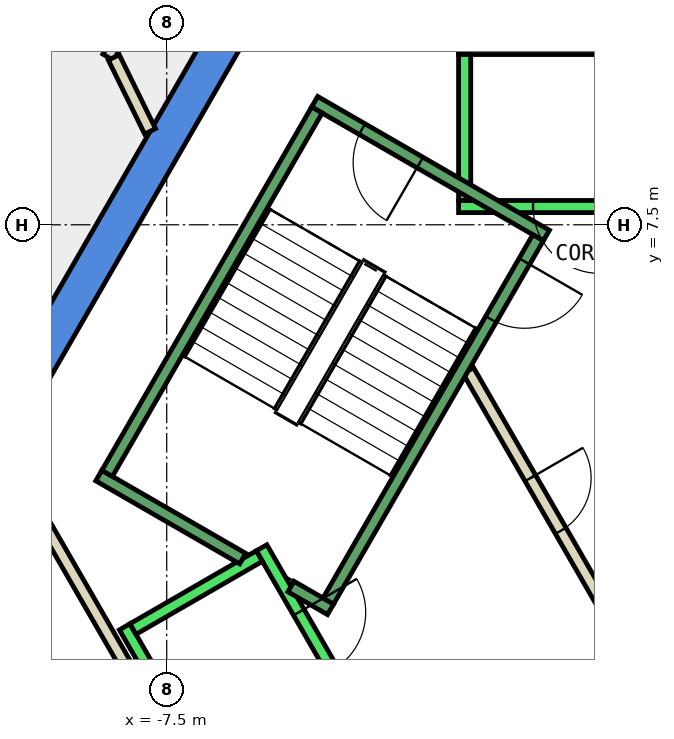
"""IFC4 building model, lengths in metres.
Left out: names, types, materials, properties, quantities, classifications, styles, units other than length and angle.
Written with IfcOpenShell. Run it as: python <this file> out.ifc"""

import sys

from ifc_helpers import new_model, si_unit, direction, frame, frame_2d, origin, place, context, subcontext, project, spatial, polyline, rectangle, outline, extrude, element, fill, save


model = new_model("IFC4")
c1 = context("Model", 3, precision=1e-05, world=origin(), true_north=direction((0.0, 1.0)))
c2 = subcontext(c1, "Body", "Model", "MODEL_VIEW")
j1 = project(units=[si_unit("LENGTHUNIT", "METRE"), si_unit("PLANEANGLEUNIT", "RADIAN")], contexts=[c1])
p1 = place(None, origin())
s1 = spatial("IfcSite", under=j1, at=p1, CompositionType="ELEMENT")
p2 = place(p1, origin())
s2 = spatial("IfcBuilding", under=s1, at=p2, CompositionType="ELEMENT")
p3 = place(p2, frame((0.0, 0.0, 263.0)))
s3 = spatial("IfcBuildingStorey", under=s2, at=p3, CompositionType="ELEMENT", Elevation=263.0)
p4 = place(p3, frame((0.0, 0.0, -0.34)))
e1 = element("IfcWall", 1, at=p4, inside=s3, PredefinedType="SHEAR", context=c2, shape_type="SweptSolid", body=[
    extrude(outline(polyline([(-10.535, 4.253), (-10.015, 3.953), (-5.427, 11.9), (-5.774, 12.5), (-10.535, 4.253)])), origin(), (0.0, 0.0, 1.0), 3.6),
])
p5 = place(p3, frame((0.0, 0.0, -0.34)))
e2 = element("IfcWall", 2, at=p5, inside=s3, PredefinedType="SHEAR", context=c2, shape_type="SweptSolid", body=[
    extrude(outline(polyline([(-11.547, 2.5), (-5.774, -7.5), (-5.427, -6.9), (-10.854, 2.5), (-11.547, 2.5)])), origin(), (0.0, 0.0, 1.0), 3.6),
])
p6 = place(p3, frame((-6.054, 14.264, 0.0), z_axis=(0.0, 0.0, 1.0), x_axis=(-0.515508653897, -0.856884372455, 0.0)))
e3 = element("IfcWall", 3, at=p6, inside=s3, PredefinedType="PARTITIONING", context=c2, shape_type="SweptSolid", body=[
    extrude(rectangle(XDim=4.677, YDim=0.2, at=frame_2d((2.339, 0.0))), origin(), (0.0, 0.0, 1.0), 3.26),
])
p7 = place(p6, frame((1.839, 0.0, 0.0)))
e4 = element("IfcOpeningElement", 4, at=p7, cuts=e3, PredefinedType="OPENING", context=c2, shape_type="SweptSolid", body=[
    extrude(rectangle(XDim=1.0, YDim=2.1, at=frame_2d((0.5, 1.05))), frame((0.0, 0.11, 0.0), z_axis=(0.0, -1.0, 0.0), x_axis=(1.0, 0.0, 0.0)), (0.0, 0.0, 1.0), 0.22),
])
p8 = place(p3, frame((-8.37, 10.252, 0.0), z_axis=(0.0, 0.0, 1.0), x_axis=(0.440562172885, -0.897722101668, 0.0)))
e5 = element("IfcWall", 5, at=p8, inside=s3, PredefinedType="PARTITIONING", context=c2, shape_type="SweptSolid", body=[
    extrude(rectangle(XDim=1.353, YDim=0.2, at=frame_2d((0.677, 0.0))), origin(), (0.0, 0.0, 1.0), 3.26),
])
p9 = place(p3, frame((-10.919, 10.057, 0.0), z_axis=(0.0, 0.0, 1.0), x_axis=(0.515568955032, 0.856848091908, 0.0)))
e6 = element("IfcWall", 6, at=p9, inside=s3, PredefinedType="PARTITIONING", context=c2, shape_type="SweptSolid", body=[
    extrude(rectangle(XDim=3.177, YDim=0.2, at=frame_2d((1.588, 0.0))), origin(), (0.0, 0.0, 1.0), 3.26),
])
p10 = place(p9, frame((1.088, 0.0, 0.0)))
e7 = element("IfcOpeningElement", 7, at=p10, cuts=e6, PredefinedType="OPENING", context=c2, shape_type="SweptSolid", body=[
    extrude(rectangle(XDim=1.0, YDim=2.1, at=frame_2d((0.5, 1.05))), frame((0.0, 0.11, 0.0), z_axis=(0.0, -1.0, 0.0), x_axis=(1.0, 0.0, 0.0)), (0.0, 0.0, 1.0), 0.22),
])
p11 = place(p3, frame((-9.751, 2.99, 0.0), z_axis=(0.0, 0.0, 1.0), x_axis=(0.500012163284, -0.866018381195, 0.0)))
e8 = element("IfcWall", 8, at=p11, inside=s3, PredefinedType="PARTITIONING", context=c2, shape_type="SweptSolid", body=[
    extrude(rectangle(XDim=8.0, YDim=0.2, at=frame_2d((4.0, 0.0))), origin(), (0.0, 0.0, 1.0), 3.26),
])
p12 = place(p3, frame((-0.982, -1.0, 0.0), z_axis=(0.0, 0.0, 1.0), x_axis=(0.50024047865, 0.865886518847, 0.0)))
e9 = element("IfcWall", 9, at=p12, inside=s3, PredefinedType="PARTITIONING", context=c2, shape_type="SweptSolid", body=[
    extrude(rectangle(XDim=1.863, YDim=0.2, at=frame_2d((0.931, 0.0))), origin(), (0.0, 0.0, 1.0), 3.26),
])
p13 = place(p3, frame((-2.54, 5.1, 0.0), z_axis=(0.0, 0.0, 1.0), x_axis=(0.499925051871, -0.866068670783, 0.0)))
e10 = element("IfcWall", 10, at=p13, inside=s3, PredefinedType="PARTITIONING", context=c2, shape_type="SweptSolid", body=[
    extrude(rectangle(XDim=5.181, YDim=0.2, at=frame_2d((2.59, 0.0))), origin(), (0.0, 0.0, 1.0), 3.26),
])
p14 = place(p13, frame((2.04, 0.0, 0.0)))
e11 = element("IfcOpeningElement", 11, at=p14, cuts=e10, PredefinedType="OPENING", context=c2, shape_type="SweptSolid", body=[
    extrude(rectangle(XDim=1.0, YDim=2.1, at=frame_2d((0.5, 1.05))), frame((0.0, 0.11, 0.0), z_axis=(0.0, -1.0, 0.0), x_axis=(1.0, 0.0, 0.0)), (0.0, 0.0, 1.0), 0.22),
])
p15 = place(p3, frame((2.7, 7.8, 0.0), z_axis=(0.0, 0.0, 1.0), x_axis=(-1.0, 0.0, 0.0)))
e12 = element("IfcWall", 12, at=p15, inside=s3, PredefinedType="STANDARD", context=c2, shape_type="SweptSolid", body=[
    extrude(rectangle(XDim=5.4, YDim=0.2, at=frame_2d((2.7, 0.0))), origin(), (0.0, 0.0, 1.0), 3.26),
])
p16 = place(p15, frame((1.225, 0.0, 0.0)))
e13 = element("IfcOpeningElement", 13, at=p16, cuts=e12, PredefinedType="OPENING", context=c2, shape_type="SweptSolid", body=[
    extrude(rectangle(XDim=1.1, YDim=2.1, at=frame_2d((0.55, 1.05))), frame((0.0, 0.11, 0.0), z_axis=(0.0, -1.0, 0.0), x_axis=(1.0, 0.0, 0.0)), (0.0, 0.0, 1.0), 0.22),
])
p17 = place(p15, frame((3.075, 0.0, 0.0)))
e14 = element("IfcOpeningElement", 14, at=p17, cuts=e12, PredefinedType="OPENING", context=c2, shape_type="SweptSolid", body=[
    extrude(rectangle(XDim=1.1, YDim=2.1, at=frame_2d((0.55, 1.05))), frame((0.0, 0.11, 0.0), z_axis=(0.0, -1.0, 0.0), x_axis=(1.0, 0.0, 0.0)), (0.0, 0.0, 1.0), 0.22),
])
p18 = place(p3, frame((2.7, 10.4, 0.0), z_axis=(0.0, 0.0, 1.0), x_axis=(-1.0, 0.0, 0.0)))
e15 = element("IfcWall", 15, at=p18, inside=s3, PredefinedType="STANDARD", context=c2, shape_type="SweptSolid", body=[
    extrude(rectangle(XDim=5.4, YDim=0.2, at=frame_2d((2.7, 0.0))), origin(), (0.0, 0.0, 1.0), 3.26),
])
p19 = place(p3, frame((-2.6, 7.9, 0.0), z_axis=(0.0, 0.0, 1.0), x_axis=(0.0, 1.0, 0.0)))
e16 = element("IfcWall", 16, at=p19, inside=s3, PredefinedType="STANDARD", context=c2, shape_type="SweptSolid", body=[
    extrude(rectangle(XDim=2.4, YDim=0.2, at=frame_2d((1.2, 0.0))), origin(), (0.0, 0.0, 1.0), 3.26),
])
p20 = place(p3, frame((-5.94, 2.188, 0.0), z_axis=(0.0, 0.0, 1.0), x_axis=(0.500034260056, -0.866005622828, 0.0)))
e17 = element("IfcWall", 17, at=p20, inside=s3, PredefinedType="STANDARD", context=c2, shape_type="SweptSolid", body=[
    extrude(rectangle(XDim=5.399, YDim=0.2, at=frame_2d((2.7, 0.0))), origin(), (0.0, 0.0, 1.0), 3.26),
])
p21 = place(p20, frame((3.075, 0.0, 0.0)))
e18 = element("IfcOpeningElement", 18, at=p21, cuts=e17, PredefinedType="OPENING", context=c2, shape_type="SweptSolid", body=[
    extrude(rectangle(XDim=1.1, YDim=2.1, at=frame_2d((0.55, 1.05))), frame((0.0, 0.11, 0.0), z_axis=(0.0, -1.0, 0.0), x_axis=(1.0, 0.0, 0.0)), (0.0, 0.0, 1.0), 0.22),
])
p22 = place(p20, frame((1.225, 0.0, 0.0)))
e19 = element("IfcOpeningElement", 19, at=p22, cuts=e17, PredefinedType="OPENING", context=c2, shape_type="SweptSolid", body=[
    extrude(rectangle(XDim=1.1, YDim=2.1, at=frame_2d((0.55, 1.05))), frame((0.0, 0.11, 0.0), z_axis=(0.0, -1.0, 0.0), x_axis=(1.0, 0.0, 0.0)), (0.0, 0.0, 1.0), 0.22),
])
p23 = place(p3, frame((-8.192, 0.888, 0.0), z_axis=(0.0, 0.0, 1.0), x_axis=(0.500034260056, -0.866005622828, 0.0)))
e20 = element("IfcWall", 20, at=p23, inside=s3, PredefinedType="STANDARD", context=c2, shape_type="SweptSolid", body=[
    extrude(rectangle(XDim=5.399, YDim=0.2, at=frame_2d((2.7, 0.0))), origin(), (0.0, 0.0, 1.0), 3.26),
])
p24 = place(p3, frame((-5.977, 2.052, 0.0), z_axis=(0.0, 0.0, 1.0), x_axis=(-0.865973769406, -0.500089422704, 0.0)))
e21 = element("IfcWall", 21, at=p24, inside=s3, PredefinedType="STANDARD", context=c2, shape_type="SweptSolid", body=[
    extrude(rectangle(XDim=2.399, YDim=0.2, at=frame_2d((1.2, 0.0))), origin(), (0.0, 0.0, 1.0), 3.26),
])
p25 = place(p3, frame((-1.256, 7.324, 0.0), z_axis=(0.0, 0.0, 1.0), x_axis=(-0.866046073146, 0.499964197906, 0.0)))
e22 = element("IfcWall", 22, at=p25, inside=s3, PredefinedType="STANDARD", context=c2, shape_type="SweptSolid", body=[
    extrude(rectangle(XDim=4.4, YDim=0.2, at=frame_2d((2.2, 0.0))), origin(), (0.0, 0.0, 1.0), 3.26),
])
p26 = place(p25, frame((2.4, 0.0, 0.0)))
e23 = element("IfcOpeningElement", 23, at=p26, cuts=e22, PredefinedType="OPENING", context=c2, shape_type="SweptSolid", body=[
    extrude(rectangle(XDim=1.1, YDim=2.2, at=frame_2d((0.55, 1.1))), frame((0.0, 0.11, 0.0), z_axis=(0.0, -1.0, 0.0), x_axis=(1.0, 0.0, 0.0)), (0.0, 0.0, 1.0), 0.22),
])
p27 = place(p3, frame((-6.25, 2.01, 0.0), z_axis=(0.0, 0.0, 1.0), x_axis=(-0.86611865017, 0.499838457731, 0.0)))
e24 = element("IfcWall", 24, at=p27, inside=s3, PredefinedType="STANDARD", context=c2, shape_type="SweptSolid", body=[
    extrude(rectangle(XDim=2.733, YDim=0.2, at=frame_2d((1.366, 0.0))), origin(), (0.0, 0.0, 1.0), 3.26),
])
p28 = place(p3, frame((-4.806, 1.176, 0.0), z_axis=(0.0, 0.0, 1.0), x_axis=(-0.866558586415, 0.499075361355, 0.0)))
e25 = element("IfcWall", 25, at=p28, inside=s3, PredefinedType="STANDARD", context=c2, shape_type="SweptSolid", body=[
    extrude(rectangle(XDim=0.751, YDim=0.2, at=frame_2d((0.376, 0.0))), origin(), (0.0, 0.0, 1.0), 3.26),
])
p29 = place(p3, frame((-1.393, 7.288, 0.0), z_axis=(0.0, 0.0, 1.0), x_axis=(-0.499963383562, -0.866046543262, 0.0)))
e26 = element("IfcWall", 26, at=p29, inside=s3, PredefinedType="STANDARD", context=c2, shape_type="SweptSolid", body=[
    extrude(rectangle(XDim=6.9, YDim=0.2, at=frame_2d((3.45, 0.0))), origin(), (0.0, 0.0, 1.0), 3.26),
])
p30 = place(p29, frame((0.45, 0.0, 0.0)))
e27 = element("IfcOpeningElement", 27, at=p30, cuts=e26, PredefinedType="OPENING", context=c2, shape_type="SweptSolid", body=[
    extrude(rectangle(XDim=1.1, YDim=2.2, at=frame_2d((0.55, 1.1))), frame((0.0, 0.11, 0.0), z_axis=(0.0, -1.0, 0.0), x_axis=(1.0, 0.0, 0.0)), (0.0, 0.0, 1.0), 0.22),
])
p31 = place(p3, frame((-5.03, 9.388, 0.0), z_axis=(0.0, 0.0, 1.0), x_axis=(-0.499978703459, -0.866037698999, 0.0)))
e28 = element("IfcWall", 28, at=p31, inside=s3, PredefinedType="STANDARD", context=c2, shape_type="SweptSolid", body=[
    extrude(rectangle(XDim=6.9, YDim=0.2, at=frame_2d((3.45, 0.0))), origin(), (0.0, 0.0, 1.0), 3.26),
])
p32 = place(p14, origin())
e29 = element("IfcDoor", 29, at=p32, inside=s3, OperationType="SINGLE_SWING_RIGHT", PredefinedType="DOOR", context=c2, shape_type="SweptSolid", body=[
    extrude(rectangle(XDim=1.0, YDim=2.1, at=frame_2d((0.5, 1.05))), frame((0.0, 0.025, 0.0), z_axis=(0.0, -1.0, 0.0), x_axis=(1.0, 0.0, 0.0)), (0.0, 0.0, 1.0), 0.05),
])
fill(e11, e29)
p33 = place(p17, origin())
e30 = element("IfcDoor", 30, at=p33, inside=s3, OperationType="SLIDING_TO_LEFT", PredefinedType="DOOR", context=c2, shape_type="SweptSolid", body=[
    extrude(rectangle(XDim=1.1, YDim=2.1, at=frame_2d((0.55, 1.05))), frame((0.0, 0.025, 0.0), z_axis=(0.0, -1.0, 0.0), x_axis=(1.0, 0.0, 0.0)), (0.0, 0.0, 1.0), 0.05),
])
fill(e14, e30)
p34 = place(p22, origin())
e31 = element("IfcDoor", 31, at=p34, inside=s3, OperationType="SLIDING_TO_LEFT", PredefinedType="DOOR", context=c2, shape_type="SweptSolid", body=[
    extrude(rectangle(XDim=1.1, YDim=2.1, at=frame_2d((0.55, 1.05))), frame((0.0, 0.025, 0.0), z_axis=(0.0, -1.0, 0.0), x_axis=(1.0, 0.0, 0.0)), (0.0, 0.0, 1.0), 0.05),
])
fill(e19, e31)
p35 = place(p30, origin())
e32 = element("IfcDoor", 32, at=p35, inside=s3, OperationType="SINGLE_SWING_LEFT", PredefinedType="DOOR", context=c2, shape_type="SweptSolid", body=[
    extrude(rectangle(XDim=1.1, YDim=2.2, at=frame_2d((0.55, 1.1))), frame((0.0, 0.025, 0.0), z_axis=(0.0, -1.0, 0.0), x_axis=(1.0, 0.0, 0.0)), (0.0, 0.0, 1.0), 0.05),
])
fill(e27, e32)
p36 = place(p26, origin())
e33 = element("IfcDoor", 33, at=p36, inside=s3, OperationType="SINGLE_SWING_LEFT", PredefinedType="DOOR", context=c2, shape_type="SweptSolid", body=[
    extrude(rectangle(XDim=1.1, YDim=2.2, at=frame_2d((0.55, 1.1))), frame((0.0, 0.025, 0.0), z_axis=(0.0, -1.0, 0.0), x_axis=(1.0, 0.0, 0.0)), (0.0, 0.0, 1.0), 0.05),
])
fill(e23, e33)
save(model, sys.argv[1])
